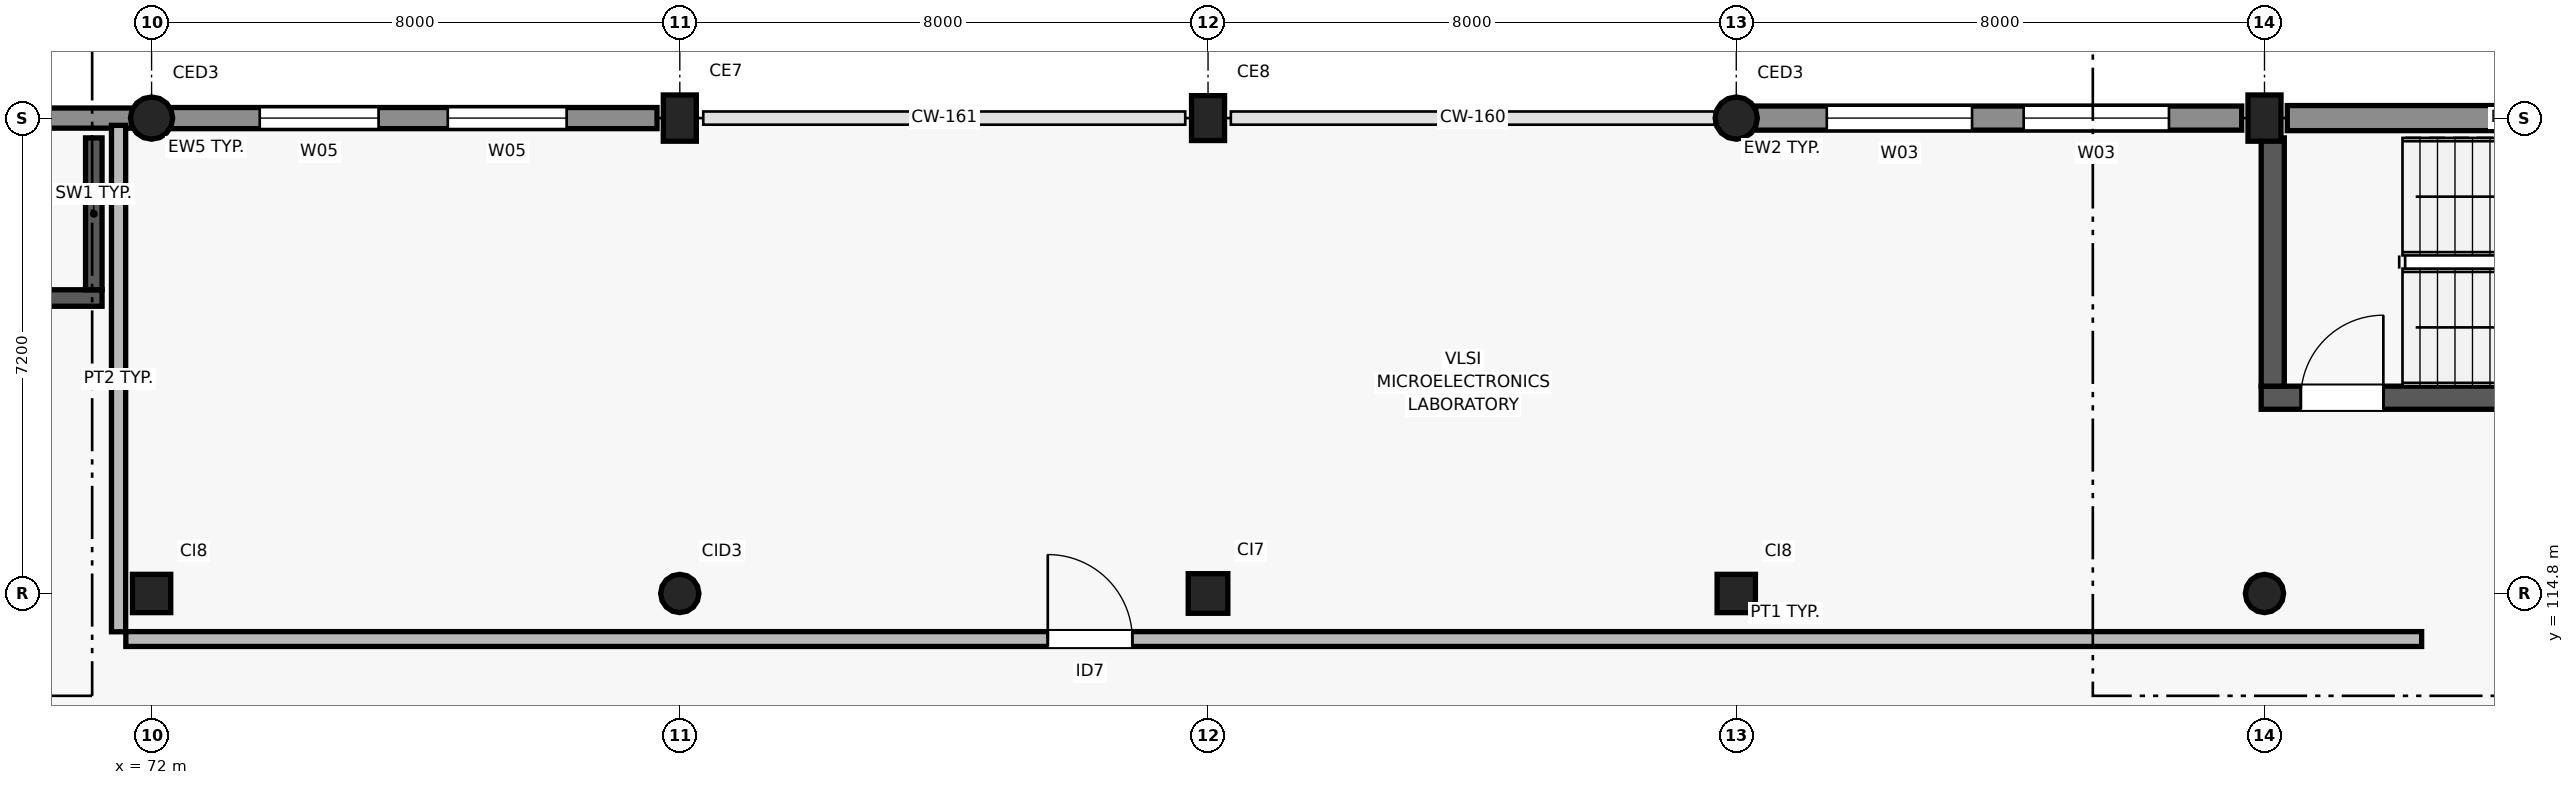
"""IFC4 building model, lengths in metres.
Left out: names, types, materials, properties, quantities, classifications, styles, units other than length and angle.
Written with IfcOpenShell. Run it as: python <this file> out.ifc"""

import sys

from ifc_helpers import new_model, si_unit, direction, frame, frame_2d, origin, origin_2d, place, context, subcontext, project, spatial, rectangle, circle, extrude, element, fill, save


model = new_model("IFC4")
c1 = context("Model", 3, precision=1e-05, world=origin(), true_north=direction((0.0, 1.0)))
c2 = subcontext(c1, "Body", "Model", "MODEL_VIEW")
j1 = project(units=[si_unit("LENGTHUNIT", "METRE"), si_unit("PLANEANGLEUNIT", "RADIAN")], contexts=[c1])
p1 = place(None, origin())
s1 = spatial("IfcSite", under=j1, at=p1, CompositionType="ELEMENT")
p2 = place(p1, origin())
s2 = spatial("IfcBuilding", under=s1, at=p2, CompositionType="ELEMENT")
p3 = place(p2, frame((0.0, 0.0, 13.2)))
s3 = spatial("IfcBuildingStorey", under=s2, at=p3, CompositionType="ELEMENT", Elevation=13.2)
p4 = place(p3, frame((72.0, 114.8, 0.0), z_axis=(0.0, 0.0, 1.0), x_axis=(1.0, 0.0, 0.0)))
e1 = element("IfcColumn", 1, at=p4, inside=s3, PredefinedType="COLUMN", context=c2, shape_type="SweptSolid", body=[
    extrude(rectangle(XDim=0.58, YDim=0.58, at=origin_2d()), origin(), (0.0, 0.0, 1.0), 4.2),
])
p5 = place(p3, frame((72.0, 122.0, 0.0), z_axis=(0.0, 0.0, 1.0), x_axis=(1.0, 0.0, 0.0)))
e2 = element("IfcColumn", 2, at=p5, inside=s3, PredefinedType="COLUMN", context=c2, shape_type="SweptSolid", body=[
    extrude(circle(Radius=0.32, at=origin_2d()), origin(), (0.0, 0.0, 1.0), 4.2),
])
p6 = place(p3, frame((80.0, 114.8, 0.0), z_axis=(0.0, 0.0, 1.0), x_axis=(1.0, 0.0, 0.0)))
e3 = element("IfcColumn", 3, at=p6, inside=s3, PredefinedType="COLUMN", context=c2, shape_type="SweptSolid", body=[
    extrude(circle(Radius=0.29, at=origin_2d()), origin(), (0.0, 0.0, 1.0), 4.2),
])
p7 = place(p3, frame((80.0, 122.0, 0.0), z_axis=(0.0, 0.0, 1.0), x_axis=(1.0, 0.0, 0.0)))
e4 = element("IfcColumn", 4, at=p7, inside=s3, PredefinedType="COLUMN", context=c2, shape_type="SweptSolid", body=[
    extrude(rectangle(XDim=0.7, YDim=0.5, at=origin_2d()), origin(), (0.0, 0.0, 1.0), 4.2),
])
p8 = place(p3, frame((88.0, 114.8, 0.0), z_axis=(0.0, 0.0, 1.0), x_axis=(1.0, 0.0, 0.0)))
e5 = element("IfcColumn", 5, at=p8, inside=s3, PredefinedType="COLUMN", context=c2, shape_type="SweptSolid", body=[
    extrude(rectangle(XDim=0.6, YDim=0.6, at=origin_2d()), origin(), (0.0, 0.0, 1.0), 4.2),
])
p9 = place(p3, frame((88.0, 122.0, 0.0), z_axis=(0.0, 0.0, 1.0), x_axis=(1.0, 0.0, 0.0)))
e6 = element("IfcColumn", 6, at=p9, inside=s3, PredefinedType="COLUMN", context=c2, shape_type="SweptSolid", body=[
    extrude(rectangle(XDim=0.68, YDim=0.5, at=origin_2d()), origin(), (0.0, 0.0, 1.0), 4.2),
])
p10 = place(p3, frame((96.0, 114.8, 0.0), z_axis=(0.0, 0.0, 1.0), x_axis=(1.0, 0.0, 0.0)))
e7 = element("IfcColumn", 7, at=p10, inside=s3, PredefinedType="COLUMN", context=c2, shape_type="SweptSolid", body=[
    extrude(rectangle(XDim=0.58, YDim=0.58, at=origin_2d()), origin(), (0.0, 0.0, 1.0), 4.2),
])
p11 = place(p3, frame((96.0, 122.0, 0.0), z_axis=(0.0, 0.0, 1.0), x_axis=(1.0, 0.0, 0.0)))
e8 = element("IfcColumn", 8, at=p11, inside=s3, PredefinedType="COLUMN", context=c2, shape_type="SweptSolid", body=[
    extrude(circle(Radius=0.32, at=origin_2d()), origin(), (0.0, 0.0, 1.0), 4.2),
])
p12 = place(p3, frame((104.0, 114.8, 0.0), z_axis=(0.0, 0.0, 1.0), x_axis=(1.0, 0.0, 0.0)))
e9 = element("IfcColumn", 9, at=p12, inside=s3, PredefinedType="COLUMN", context=c2, shape_type="SweptSolid", body=[
    extrude(circle(Radius=0.29, at=origin_2d()), origin(), (0.0, 0.0, 1.0), 4.2),
])
p13 = place(p3, frame((104.0, 122.0, 0.0), z_axis=(0.0, 0.0, 1.0), x_axis=(1.0, 0.0, 0.0)))
e10 = element("IfcColumn", 10, at=p13, inside=s3, PredefinedType="COLUMN", context=c2, shape_type="SweptSolid", body=[
    extrude(rectangle(XDim=0.7, YDim=0.5, at=origin_2d()), origin(), (0.0, 0.0, 1.0), 4.2),
])
p14 = place(p3, frame((111.665, 122.0, 0.0), z_axis=(0.0, 0.0, 1.0), x_axis=(-1.0, 0.0, 0.0)))
e11 = element("IfcWall", 11, at=p14, inside=s3, PredefinedType="SOLIDWALL", context=c2, shape_type="SweptSolid", body=[
    extrude(rectangle(XDim=7.32, YDim=0.38, at=frame_2d((3.66, 0.0))), origin(), (0.0, 0.0, 1.0), 3.92),
])
p15 = place(p3, frame((103.655, 122.0, 0.0), z_axis=(0.0, 0.0, 1.0), x_axis=(-1.0, 0.0, 0.0)))
e12 = element("IfcWall", 12, at=p15, inside=s3, PredefinedType="SOLIDWALL", context=c2, shape_type="SweptSolid", body=[
    extrude(rectangle(XDim=7.386, YDim=0.365, at=frame_2d((3.693, 0.0))), origin(), (0.0, 0.0, 1.0), 3.36),
])
p16 = place(p15, frame((1.102, 0.0, 0.9)))
e13 = element("IfcOpeningElement", 13, at=p16, cuts=e12, PredefinedType="OPENING", context=c2, shape_type="SweptSolid", body=[
    extrude(rectangle(XDim=2.2, YDim=1.8, at=frame_2d((1.1, 0.9))), frame((0.0, 0.192, 0.0), z_axis=(0.0, -1.0, 0.0), x_axis=(1.0, 0.0, 0.0)), (0.0, 0.0, 1.0), 0.385),
])
p17 = place(p15, frame((4.084, 0.0, 0.9)))
e14 = element("IfcOpeningElement", 14, at=p17, cuts=e12, PredefinedType="OPENING", context=c2, shape_type="SweptSolid", body=[
    extrude(rectangle(XDim=2.2, YDim=1.8, at=frame_2d((1.1, 0.9))), frame((0.0, 0.192, 0.0), z_axis=(0.0, -1.0, 0.0), x_axis=(1.0, 0.0, 0.0)), (0.0, 0.0, 1.0), 0.385),
])
p18 = place(p3, frame((79.655, 122.0, 0.0), z_axis=(0.0, 0.0, 1.0), x_axis=(-1.0, 0.0, 0.0)))
e15 = element("IfcWall", 15, at=p18, inside=s3, PredefinedType="SOLIDWALL", context=c2, shape_type="SweptSolid", body=[
    extrude(rectangle(XDim=7.386, YDim=0.32, at=frame_2d((3.693, 0.0))), origin(), (0.0, 0.0, 1.0), 3.36),
])
p19 = place(p18, frame((1.369, 0.0, 0.9)))
e16 = element("IfcOpeningElement", 16, at=p19, cuts=e15, PredefinedType="OPENING", context=c2, shape_type="SweptSolid", body=[
    extrude(rectangle(XDim=1.8, YDim=1.8, at=frame_2d((0.9, 0.9))), frame((0.0, 0.17, 0.0), z_axis=(0.0, -1.0, 0.0), x_axis=(1.0, 0.0, 0.0)), (0.0, 0.0, 1.0), 0.34),
])
p20 = place(p18, frame((4.217, 0.0, 0.9)))
e17 = element("IfcOpeningElement", 17, at=p20, cuts=e15, PredefinedType="OPENING", context=c2, shape_type="SweptSolid", body=[
    extrude(rectangle(XDim=1.8, YDim=1.8, at=frame_2d((0.9, 0.9))), frame((0.0, 0.17, 0.0), z_axis=(0.0, -1.0, 0.0), x_axis=(1.0, 0.0, 0.0)), (0.0, 0.0, 1.0), 0.34),
])
p21 = place(p3, frame((71.731, 122.0, 0.0), z_axis=(0.0, 0.0, 1.0), x_axis=(-1.0, 0.0, 0.0)))
e18 = element("IfcWall", 18, at=p21, inside=s3, PredefinedType="SOLIDWALL", context=c2, shape_type="SweptSolid", body=[
    extrude(rectangle(XDim=7.396, YDim=0.305, at=frame_2d((3.698, 0.0))), origin(), (0.0, 0.0, 1.0), 3.92),
])
p22 = place(p3, frame((68.75, 119.275, 0.0), z_axis=(0.0, 0.0, 1.0), x_axis=(1.0, 0.0, 0.0)))
e19 = element("IfcWall", 19, at=p22, inside=s3, PredefinedType="SHEAR", context=c2, shape_type="SweptSolid", body=[
    extrude(rectangle(XDim=2.5, YDim=0.25, at=frame_2d((1.25, 0.0))), origin(), (0.0, 0.0, 1.0), 3.92),
])
p23 = place(p22, frame((0.8, 0.0, 0.0)))
e20 = element("IfcOpeningElement", 20, at=p23, cuts=e19, PredefinedType="OPENING", context=c2, shape_type="SweptSolid", body=[
    extrude(rectangle(XDim=0.9, YDim=2.05, at=frame_2d((0.45, 1.025))), frame((0.0, 0.135, 0.0), z_axis=(0.0, -1.0, 0.0), x_axis=(1.0, 0.0, 0.0)), (0.0, 0.0, 1.0), 0.27),
])
p24 = place(p3, frame((71.125, 119.4, 0.0), z_axis=(0.0, 0.0, 1.0), x_axis=(0.0, 1.0, 0.0)))
e21 = element("IfcWall", 21, at=p24, inside=s3, PredefinedType="SHEAR", context=c2, shape_type="SweptSolid", body=[
    extrude(rectangle(XDim=2.3, YDim=0.25, at=frame_2d((1.15, 0.0))), origin(), (0.0, 0.0, 1.0), 3.92),
])
p25 = place(p3, frame((103.95, 117.765, 0.0), z_axis=(0.0, 0.0, 1.0), x_axis=(1.0, 0.0, 0.0)))
e22 = element("IfcWall", 22, at=p25, inside=s3, PredefinedType="SHEAR", context=c2, shape_type="SweptSolid", body=[
    extrude(rectangle(XDim=8.1, YDim=0.35, at=frame_2d((4.05, 0.0))), origin(), (0.0, 0.0, 1.0), 3.92),
])
p26 = place(p25, frame((0.6, 0.0, 0.0)))
e23 = element("IfcOpeningElement", 23, at=p26, cuts=e22, PredefinedType="OPENING", context=c2, shape_type="SweptSolid", body=[
    extrude(rectangle(XDim=1.25, YDim=2.2, at=frame_2d((0.625, 1.1))), frame((0.0, 0.185, 0.0), z_axis=(0.0, -1.0, 0.0), x_axis=(1.0, 0.0, 0.0)), (0.0, 0.0, 1.0), 0.37),
])
p27 = place(p3, frame((104.125, 117.94, 0.0), z_axis=(0.0, 0.0, 1.0), x_axis=(0.0, 1.0, 0.0)))
e24 = element("IfcWall", 24, at=p27, inside=s3, PredefinedType="SHEAR", context=c2, shape_type="SweptSolid", body=[
    extrude(rectangle(XDim=3.76, YDim=0.35, at=frame_2d((1.88, 0.0))), origin(), (0.0, 0.0, 1.0), 3.92),
])
p28 = place(p3, frame((71.61, 114.11, 0.0), z_axis=(0.0, 0.0, 1.0), x_axis=(1.0, 0.0, 0.0)))
e25 = element("IfcWall", 25, at=p28, inside=s3, PredefinedType="PARTITIONING", context=c2, shape_type="SweptSolid", body=[
    extrude(rectangle(XDim=34.77, YDim=0.225, at=frame_2d((17.385, 0.0))), origin(), (0.0, 0.0, 1.0), 3.9),
])
p29 = place(p28, frame((13.963, 0.0, 0.0)))
e26 = element("IfcOpeningElement", 26, at=p29, cuts=e25, PredefinedType="OPENING", context=c2, shape_type="SweptSolid", body=[
    extrude(rectangle(XDim=1.28, YDim=2.2, at=frame_2d((0.64, 1.1))), frame((0.0, 0.123, 0.0), z_axis=(0.0, -1.0, 0.0), x_axis=(1.0, 0.0, 0.0)), (0.0, 0.0, 1.0), 0.245),
])
p30 = place(p3, frame((71.5, 114.22, 0.0), z_axis=(0.0, 0.0, 1.0), x_axis=(0.0, 1.0, 0.0)))
e27 = element("IfcWall", 27, at=p30, inside=s3, PredefinedType="PARTITIONING", context=c2, shape_type="SweptSolid", body=[
    extrude(rectangle(XDim=7.67, YDim=0.215, at=frame_2d((3.835, 0.0))), origin(), (0.0, 0.0, 1.0), 3.9),
])
p31 = place(p16, origin())
e28 = element("IfcWindow", 28, at=p31, inside=s3, PartitioningType="SINGLE_PANEL", PredefinedType="WINDOW", context=c2, shape_type="SweptSolid", body=[
    extrude(rectangle(XDim=2.2, YDim=1.8, at=frame_2d((1.1, 0.9))), frame((0.0, 0.03, 0.0), z_axis=(0.0, -1.0, 0.0), x_axis=(1.0, 0.0, 0.0)), (0.0, 0.0, 1.0), 0.06),
])
fill(e13, e28)
p32 = place(p17, origin())
e29 = element("IfcWindow", 29, at=p32, inside=s3, PartitioningType="SINGLE_PANEL", PredefinedType="WINDOW", context=c2, shape_type="SweptSolid", body=[
    extrude(rectangle(XDim=2.2, YDim=1.8, at=frame_2d((1.1, 0.9))), frame((0.0, 0.03, 0.0), z_axis=(0.0, -1.0, 0.0), x_axis=(1.0, 0.0, 0.0)), (0.0, 0.0, 1.0), 0.06),
])
fill(e14, e29)
p33 = place(p19, origin())
e30 = element("IfcWindow", 30, at=p33, inside=s3, PartitioningType="SINGLE_PANEL", PredefinedType="WINDOW", context=c2, shape_type="SweptSolid", body=[
    extrude(rectangle(XDim=1.8, YDim=1.8, at=frame_2d((0.9, 0.9))), frame((0.0, 0.03, 0.0), z_axis=(0.0, -1.0, 0.0), x_axis=(1.0, 0.0, 0.0)), (0.0, 0.0, 1.0), 0.06),
])
fill(e16, e30)
p34 = place(p20, origin())
e31 = element("IfcWindow", 31, at=p34, inside=s3, PartitioningType="SINGLE_PANEL", PredefinedType="WINDOW", context=c2, shape_type="SweptSolid", body=[
    extrude(rectangle(XDim=1.8, YDim=1.8, at=frame_2d((0.9, 0.9))), frame((0.0, 0.03, 0.0), z_axis=(0.0, -1.0, 0.0), x_axis=(1.0, 0.0, 0.0)), (0.0, 0.0, 1.0), 0.06),
])
fill(e17, e31)
p35 = place(p26, origin())
e32 = element("IfcDoor", 32, at=p35, inside=s3, OperationType="SINGLE_SWING_RIGHT", PredefinedType="DOOR", context=c2, shape_type="SweptSolid", body=[
    extrude(rectangle(XDim=1.25, YDim=2.2, at=frame_2d((0.625, 1.1))), frame((0.0, 0.025, 0.0), z_axis=(0.0, -1.0, 0.0), x_axis=(1.0, 0.0, 0.0)), (0.0, 0.0, 1.0), 0.05),
])
fill(e23, e32)
p36 = place(p29, origin())
e33 = element("IfcDoor", 33, at=p36, inside=s3, OperationType="SINGLE_SWING_LEFT", PredefinedType="DOOR", context=c2, shape_type="SweptSolid", body=[
    extrude(rectangle(XDim=1.28, YDim=2.2, at=frame_2d((0.64, 1.1))), frame((0.0, 0.025, 0.0), z_axis=(0.0, -1.0, 0.0), x_axis=(1.0, 0.0, 0.0)), (0.0, 0.0, 1.0), 0.05),
])
fill(e26, e33)
save(model, sys.argv[1])
